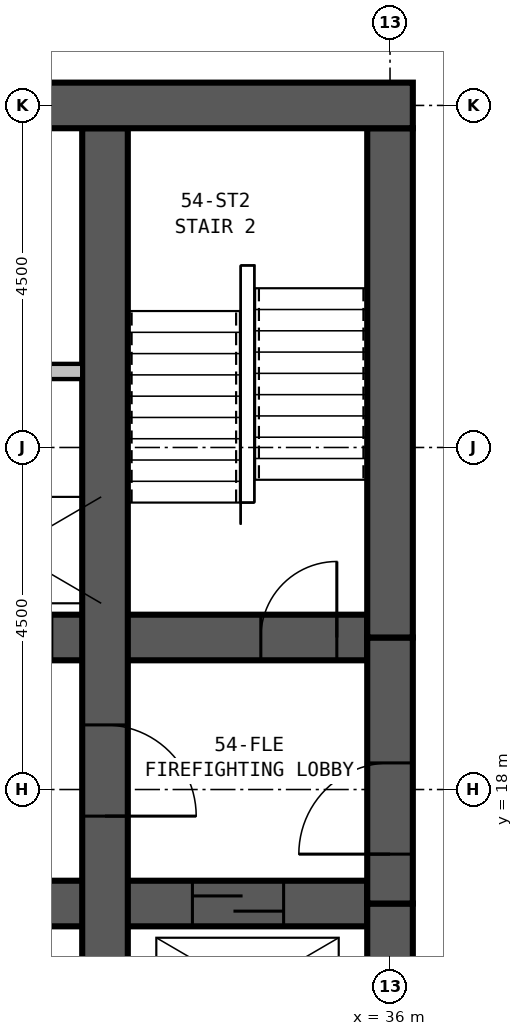
"""IFC4 building model, lengths in metres.
Left out: names, types, materials, properties, quantities, classifications, styles, units other than length and angle.
Written with IfcOpenShell. Run it as: python <this file> out.ifc"""

import sys

from ifc_helpers import new_model, si_unit, direction, frame, frame_2d, origin, place, context, subcontext, project, spatial, rectangle, extrude, element, fill, save


model = new_model("IFC4")
c1 = context("Model", 3, precision=1e-05, world=origin(), true_north=direction((0.0, 1.0)))
c2 = subcontext(c1, "Body", "Model", "MODEL_VIEW")
j1 = project(units=[si_unit("LENGTHUNIT", "METRE"), si_unit("PLANEANGLEUNIT", "RADIAN")], contexts=[c1])
p1 = place(None, origin())
s1 = spatial("IfcSite", under=j1, at=p1, CompositionType="ELEMENT")
p2 = place(p1, origin())
s2 = spatial("IfcBuilding", under=s1, at=p2, CompositionType="ELEMENT")
p3 = place(p2, frame((0.0, 0.0, 207.9)))
s3 = spatial("IfcBuildingStorey", under=s2, at=p3, CompositionType="ELEMENT", Elevation=207.9)
p4 = place(p3, frame((36.3, 27.0, 0.0), z_axis=(0.0, 0.0, 1.0), x_axis=(-1.0, 0.0, 0.0)))
e1 = element("IfcWall", 1, at=p4, inside=s3, PredefinedType="SHEAR", context=c2, shape_type="SweptSolid", body=[
    extrude(rectangle(XDim=23.1, YDim=0.6, at=frame_2d((11.55, 0.0))), origin(), (0.0, 0.0, 1.0), 3.5),
])
p5 = place(p4, frame((17.05, 0.0, 0.0)))
e2 = element("IfcOpeningElement", 2, at=p5, cuts=e1, PredefinedType="OPENING", context=c2, shape_type="SweptSolid", body=[
    extrude(rectangle(XDim=1.0, YDim=2.1, at=frame_2d((0.5, 1.05))), frame((0.0, 0.31, 0.0), z_axis=(0.0, -1.0, 0.0), x_axis=(1.0, 0.0, 0.0)), (0.0, 0.0, 1.0), 0.62),
])
p6 = place(p4, frame((12.05, 0.0, 0.0)))
e3 = element("IfcOpeningElement", 3, at=p6, cuts=e1, PredefinedType="OPENING", context=c2, shape_type="SweptSolid", body=[
    extrude(rectangle(XDim=1.0, YDim=2.1, at=frame_2d((0.5, 1.05))), frame((0.0, 0.31, 0.0), z_axis=(0.0, -1.0, 0.0), x_axis=(1.0, 0.0, 0.0)), (0.0, 0.0, 1.0), 0.62),
])
p7 = place(p4, frame((7.05, 0.0, 0.0)))
e4 = element("IfcOpeningElement", 4, at=p7, cuts=e1, PredefinedType="OPENING", context=c2, shape_type="SweptSolid", body=[
    extrude(rectangle(XDim=1.0, YDim=2.1, at=frame_2d((0.5, 1.05))), frame((0.0, 0.31, 0.0), z_axis=(0.0, -1.0, 0.0), x_axis=(1.0, 0.0, 0.0)), (0.0, 0.0, 1.0), 0.62),
])
p8 = place(p3, frame((32.25, 13.8, 0.0), z_axis=(0.0, 0.0, 1.0), x_axis=(0.0, 1.0, 0.0)))
e5 = element("IfcWall", 5, at=p8, inside=s3, PredefinedType="SHEAR", context=c2, shape_type="SweptSolid", body=[
    extrude(rectangle(XDim=12.9, YDim=0.6, at=frame_2d((6.45, 0.0))), origin(), (0.0, 0.0, 1.0), 3.5),
])
p9 = place(p8, frame((5.05, 0.0, 0.0), z_axis=(0.0, 0.0, 1.0), x_axis=(-1.0, 0.0, 0.0)))
e6 = element("IfcOpeningElement", 6, at=p9, cuts=e5, PredefinedType="OPENING", context=c2, shape_type="SweptSolid", body=[
    extrude(rectangle(XDim=1.2, YDim=2.1, at=frame_2d((0.6, 1.05))), frame((0.0, 0.31, 0.0), z_axis=(0.0, -1.0, 0.0), x_axis=(1.0, 0.0, 0.0)), (0.0, 0.0, 1.0), 0.62),
])
p10 = place(p3, frame((13.8, 16.5, 0.0), z_axis=(0.0, 0.0, 1.0), x_axis=(1.0, 0.0, 0.0)))
e7 = element("IfcWall", 7, at=p10, inside=s3, PredefinedType="SHEAR", context=c2, shape_type="SweptSolid", body=[
    extrude(rectangle(XDim=21.9, YDim=0.6, at=frame_2d((10.95, 0.0))), origin(), (0.0, 0.0, 1.0), 3.5),
])
p11 = place(p10, frame((5.75, 0.0, 0.0), z_axis=(0.0, 0.0, 1.0), x_axis=(-1.0, 0.0, 0.0)))
e8 = element("IfcOpeningElement", 8, at=p11, cuts=e7, PredefinedType="OPENING", context=c2, shape_type="SweptSolid", body=[
    extrude(rectangle(XDim=1.0, YDim=2.1, at=frame_2d((0.5, 1.05))), frame((0.0, 0.31, 0.0), z_axis=(0.0, -1.0, 0.0), x_axis=(1.0, 0.0, 0.0)), (0.0, 0.0, 1.0), 0.62),
])
p12 = place(p10, frame((10.2, 0.0, 0.0), z_axis=(0.0, 0.0, 1.0), x_axis=(-1.0, 0.0, 0.0)))
e9 = element("IfcOpeningElement", 9, at=p12, cuts=e7, PredefinedType="OPENING", context=c2, shape_type="SweptSolid", body=[
    extrude(rectangle(XDim=1.0, YDim=2.1, at=frame_2d((0.5, 1.05))), frame((0.0, 0.31, 0.0), z_axis=(0.0, -1.0, 0.0), x_axis=(1.0, 0.0, 0.0)), (0.0, 0.0, 1.0), 0.62),
])
p13 = place(p10, frame((12.7, 0.0, 0.0), z_axis=(0.0, 0.0, 1.0), x_axis=(-1.0, 0.0, 0.0)))
e10 = element("IfcOpeningElement", 10, at=p13, cuts=e7, PredefinedType="OPENING", context=c2, shape_type="SweptSolid", body=[
    extrude(rectangle(XDim=1.0, YDim=2.1, at=frame_2d((0.5, 1.05))), frame((0.0, 0.31, 0.0), z_axis=(0.0, -1.0, 0.0), x_axis=(1.0, 0.0, 0.0)), (0.0, 0.0, 1.0), 0.62),
])
p14 = place(p10, frame((17.15, 0.0, 0.0), z_axis=(0.0, 0.0, 1.0), x_axis=(-1.0, 0.0, 0.0)))
e11 = element("IfcOpeningElement", 11, at=p14, cuts=e7, PredefinedType="OPENING", context=c2, shape_type="SweptSolid", body=[
    extrude(rectangle(XDim=1.0, YDim=2.1, at=frame_2d((0.5, 1.05))), frame((0.0, 0.31, 0.0), z_axis=(0.0, -1.0, 0.0), x_axis=(1.0, 0.0, 0.0)), (0.0, 0.0, 1.0), 0.62),
])
p15 = place(p10, frame((0.6, 0.0, 0.0)))
e12 = element("IfcOpeningElement", 12, at=p15, cuts=e7, PredefinedType="OPENING", context=c2, shape_type="SweptSolid", body=[
    extrude(rectangle(XDim=1.2, YDim=2.1, at=frame_2d((0.6, 1.05))), frame((0.0, 0.31, 0.0), z_axis=(0.0, -1.0, 0.0), x_axis=(1.0, 0.0, 0.0)), (0.0, 0.0, 1.0), 0.62),
])
p16 = place(p10, frame((19.6, 0.0, 0.0)))
e13 = element("IfcOpeningElement", 13, at=p16, cuts=e7, PredefinedType="OPENING", context=c2, shape_type="SweptSolid", body=[
    extrude(rectangle(XDim=1.2, YDim=2.1, at=frame_2d((0.6, 1.05))), frame((0.0, 0.31, 0.0), z_axis=(0.0, -1.0, 0.0), x_axis=(1.0, 0.0, 0.0)), (0.0, 0.0, 1.0), 0.62),
])
p17 = place(p3, frame((13.8, 20.0, 0.0), z_axis=(0.0, 0.0, 1.0), x_axis=(1.0, 0.0, 0.0)))
e14 = element("IfcWall", 14, at=p17, inside=s3, PredefinedType="SHEAR", context=c2, shape_type="SweptSolid", body=[
    extrude(rectangle(XDim=21.9, YDim=0.6, at=frame_2d((10.95, 0.0))), origin(), (0.0, 0.0, 1.0), 3.5),
])
p18 = place(p17, frame((0.5, 0.0, 0.0)))
e15 = element("IfcOpeningElement", 15, at=p18, cuts=e14, PredefinedType="OPENING", context=c2, shape_type="SweptSolid", body=[
    extrude(rectangle(XDim=1.0, YDim=2.1, at=frame_2d((0.5, 1.05))), frame((0.0, 0.31, 0.0), z_axis=(0.0, -1.0, 0.0), x_axis=(1.0, 0.0, 0.0)), (0.0, 0.0, 1.0), 0.62),
])
p19 = place(p17, frame((20.5, 0.0, 0.0)))
e16 = element("IfcOpeningElement", 16, at=p19, cuts=e14, PredefinedType="OPENING", context=c2, shape_type="SweptSolid", body=[
    extrude(rectangle(XDim=1.0, YDim=2.1, at=frame_2d((0.5, 1.05))), frame((0.0, 0.31, 0.0), z_axis=(0.0, -1.0, 0.0), x_axis=(1.0, 0.0, 0.0)), (0.0, 0.0, 1.0), 0.62),
])
p20 = place(p17, frame((9.15, 0.0, 0.0)))
e17 = element("IfcOpeningElement", 17, at=p20, cuts=e14, PredefinedType="OPENING", context=c2, shape_type="SweptSolid", body=[
    extrude(rectangle(XDim=1.1, YDim=2.1, at=frame_2d((0.55, 1.05))), frame((0.0, 0.31, 0.0), z_axis=(0.0, -1.0, 0.0), x_axis=(1.0, 0.0, 0.0)), (0.0, 0.0, 1.0), 0.62),
])
p21 = place(p17, frame((11.65, 0.0, 0.0)))
e18 = element("IfcOpeningElement", 18, at=p21, cuts=e14, PredefinedType="OPENING", context=c2, shape_type="SweptSolid", body=[
    extrude(rectangle(XDim=1.1, YDim=2.1, at=frame_2d((0.55, 1.05))), frame((0.0, 0.31, 0.0), z_axis=(0.0, -1.0, 0.0), x_axis=(1.0, 0.0, 0.0)), (0.0, 0.0, 1.0), 0.62),
])
p22 = place(p17, frame((14.15, 0.0, 0.0)))
e19 = element("IfcOpeningElement", 19, at=p22, cuts=e14, PredefinedType="OPENING", context=c2, shape_type="SweptSolid", body=[
    extrude(rectangle(XDim=1.1, YDim=2.1, at=frame_2d((0.55, 1.05))), frame((0.0, 0.31, 0.0), z_axis=(0.0, -1.0, 0.0), x_axis=(1.0, 0.0, 0.0)), (0.0, 0.0, 1.0), 0.62),
])
p23 = place(p17, frame((16.65, 0.0, 0.0)))
e20 = element("IfcOpeningElement", 20, at=p23, cuts=e14, PredefinedType="OPENING", context=c2, shape_type="SweptSolid", body=[
    extrude(rectangle(XDim=1.1, YDim=2.1, at=frame_2d((0.55, 1.05))), frame((0.0, 0.31, 0.0), z_axis=(0.0, -1.0, 0.0), x_axis=(1.0, 0.0, 0.0)), (0.0, 0.0, 1.0), 0.62),
])
p24 = place(p17, frame((4.75, 0.0, 0.0)))
e21 = element("IfcOpeningElement", 21, at=p24, cuts=e14, PredefinedType="OPENING", context=c2, shape_type="SweptSolid", body=[
    extrude(rectangle(XDim=1.0, YDim=2.1, at=frame_2d((0.5, 1.05))), frame((0.0, 0.31, 0.0), z_axis=(0.0, -1.0, 0.0), x_axis=(1.0, 0.0, 0.0)), (0.0, 0.0, 1.0), 0.62),
])
p25 = place(p17, frame((6.7, 0.0, 0.0)))
e22 = element("IfcOpeningElement", 22, at=p25, cuts=e14, PredefinedType="OPENING", context=c2, shape_type="SweptSolid", body=[
    extrude(rectangle(XDim=1.0, YDim=2.1, at=frame_2d((0.5, 1.05))), frame((0.0, 0.31, 0.0), z_axis=(0.0, -1.0, 0.0), x_axis=(1.0, 0.0, 0.0)), (0.0, 0.0, 1.0), 0.62),
])
p26 = place(p3, frame((36.0, 13.8, 0.0), z_axis=(0.0, 0.0, 1.0), x_axis=(0.0, 1.0, 0.0)))
e23 = element("IfcWall", 23, at=p26, inside=s3, PredefinedType="SHEAR", context=c2, shape_type="SweptSolid", body=[
    extrude(rectangle(XDim=2.7, YDim=0.6, at=frame_2d((1.35, 0.0))), origin(), (0.0, 0.0, 1.0), 3.5),
])
p27 = place(p3, frame((36.0, 16.5, 0.0), z_axis=(0.0, 0.0, 1.0), x_axis=(0.0, 1.0, 0.0)))
e24 = element("IfcWall", 24, at=p27, inside=s3, PredefinedType="SHEAR", context=c2, shape_type="SweptSolid", body=[
    extrude(rectangle(XDim=3.5, YDim=0.6, at=frame_2d((1.75, 0.0))), origin(), (0.0, 0.0, 1.0), 3.5),
])
p28 = place(p27, frame((0.65, 0.0, 0.0)))
e25 = element("IfcOpeningElement", 25, at=p28, cuts=e24, PredefinedType="OPENING", context=c2, shape_type="SweptSolid", body=[
    extrude(rectangle(XDim=1.2, YDim=2.1, at=frame_2d((0.6, 1.05))), frame((0.0, 0.31, 0.0), z_axis=(0.0, -1.0, 0.0), x_axis=(1.0, 0.0, 0.0)), (0.0, 0.0, 1.0), 0.62),
])
p29 = place(p3, frame((36.0, 20.0, 0.0), z_axis=(0.0, 0.0, 1.0), x_axis=(0.0, 1.0, 0.0)))
e26 = element("IfcWall", 26, at=p29, inside=s3, PredefinedType="SHEAR", context=c2, shape_type="SweptSolid", body=[
    extrude(rectangle(XDim=6.7, YDim=0.6, at=frame_2d((3.35, 0.0))), origin(), (0.0, 0.0, 1.0), 3.5),
])
p30 = place(p3, frame((17.55, 23.5, 0.0), z_axis=(0.0, 0.0, 1.0), x_axis=(1.0, 0.0, 0.0)))
e27 = element("IfcWall", 27, at=p30, inside=s3, PredefinedType="PARTITIONING", context=c2, shape_type="SweptSolid", body=[
    extrude(rectangle(XDim=14.4, YDim=0.2, at=frame_2d((7.2, 0.0))), origin(), (0.0, 0.0, 1.0), 3.25),
])
p31 = place(p28, origin())
e28 = element("IfcDoor", 28, at=p31, inside=s3, OperationType="SINGLE_SWING_LEFT", PredefinedType="DOOR", context=c2, shape_type="SweptSolid", body=[
    extrude(rectangle(XDim=1.2, YDim=2.1, at=frame_2d((0.6, 1.05))), frame((0.0, 0.3, 0.0), z_axis=(0.0, -1.0, 0.0), x_axis=(1.0, 0.0, 0.0)), (0.0, 0.0, 1.0), 0.6),
])
fill(e25, e28)
p32 = place(p9, origin())
e29 = element("IfcDoor", 29, at=p32, inside=s3, OperationType="SINGLE_SWING_RIGHT", PredefinedType="DOOR", context=c2, shape_type="SweptSolid", body=[
    extrude(rectangle(XDim=1.2, YDim=2.1, at=frame_2d((0.6, 1.05))), frame((0.0, 0.3, 0.0), z_axis=(0.0, -1.0, 0.0), x_axis=(1.0, 0.0, 0.0)), (0.0, 0.0, 1.0), 0.6),
])
fill(e6, e29)
p33 = place(p19, origin())
e30 = element("IfcDoor", 30, at=p33, inside=s3, OperationType="SINGLE_SWING_RIGHT", PredefinedType="DOOR", context=c2, shape_type="SweptSolid", body=[
    extrude(rectangle(XDim=1.0, YDim=2.1, at=frame_2d((0.5, 1.05))), frame((0.0, 0.3, 0.0), z_axis=(0.0, -1.0, 0.0), x_axis=(1.0, 0.0, 0.0)), (0.0, 0.0, 1.0), 0.6),
])
fill(e16, e30)
p34 = place(p16, origin())
e31 = element("IfcDoor", 31, at=p34, inside=s3, OperationType="SLIDING_TO_LEFT", PredefinedType="DOOR", context=c2, shape_type="SweptSolid", body=[
    extrude(rectangle(XDim=1.2, YDim=2.1, at=frame_2d((0.6, 1.05))), frame((0.0, 0.3, 0.0), z_axis=(0.0, -1.0, 0.0), x_axis=(1.0, 0.0, 0.0)), (0.0, 0.0, 1.0), 0.6),
])
fill(e13, e31)
save(model, sys.argv[1])
